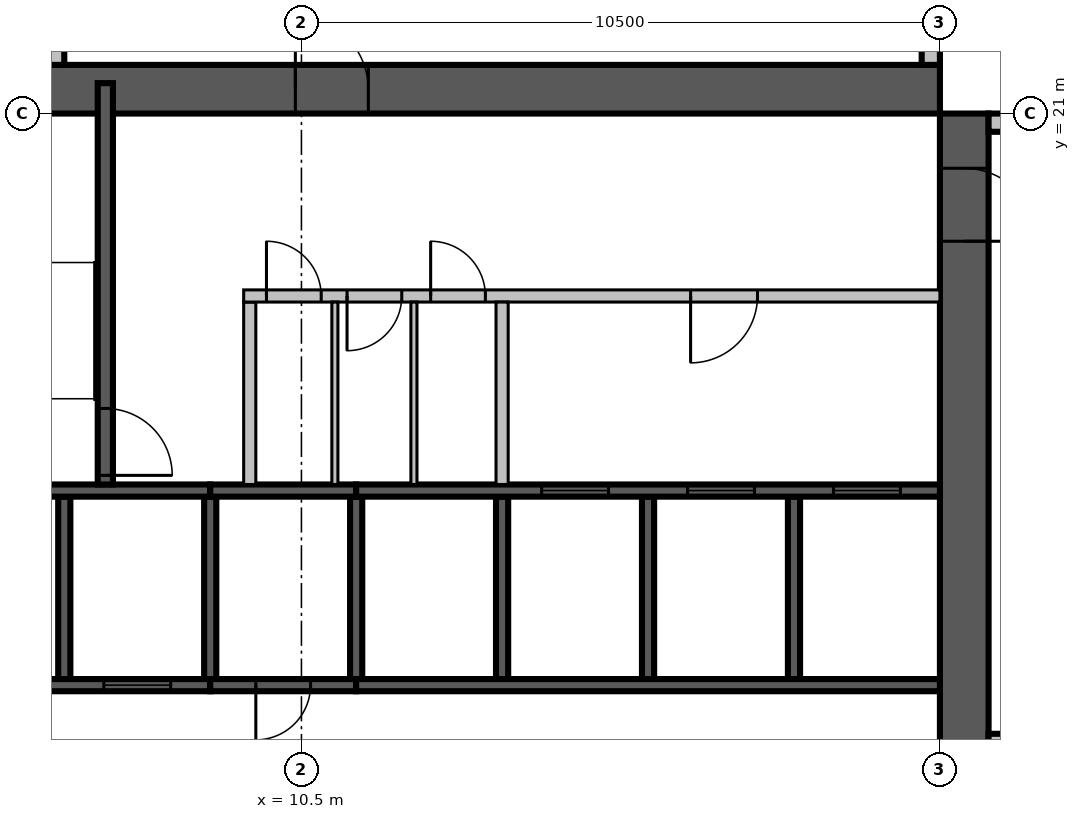
"""IFC4 building model, lengths in metres.
Left out: names, types, materials, properties, quantities, classifications, styles, units other than length and angle.
Written with IfcOpenShell. Run it as: python <this file> out.ifc"""

import sys

from ifc_helpers import new_model, si_unit, direction, frame, frame_2d, origin, place, context, subcontext, project, spatial, rectangle, extrude, source, transform, mapped, element, fill, save


model = new_model("IFC4")
c1 = context("Model", 3, precision=1e-05, world=origin(), true_north=direction((0.0, 1.0)))
c2 = subcontext(c1, "Body", "Model", "MODEL_VIEW")
j1 = project(units=[si_unit("LENGTHUNIT", "METRE"), si_unit("PLANEANGLEUNIT", "RADIAN")], contexts=[c1])
p1 = place(None, origin())
s1 = spatial("IfcSite", under=j1, at=p1, CompositionType="ELEMENT")
p2 = place(p1, origin())
s2 = spatial("IfcBuilding", under=s1, at=p2, CompositionType="ELEMENT")
p3 = place(p2, frame((0.0, 0.0, 261.4)))
s3 = spatial("IfcBuildingStorey", under=s2, at=p3, CompositionType="ELEMENT", Elevation=261.4)
m1 = source(origin(), c2, "Body", "SweptSolid", [
    extrude(rectangle(XDim=16.8, YDim=0.8, at=frame_2d((8.4, 0.0))), origin(), (0.0, 0.0, 1.0), 3.8),
])
p4 = place(p3, frame((21.4, 4.2, 0.0), z_axis=(0.0, 0.0, 1.0), x_axis=(0.0, 1.0, 0.0)))
e1 = element("IfcWall", 1, at=p4, inside=s3, PredefinedType="SHEAR", context=c2, shape_type="MappedRepresentation", body=[
    mapped(m1, transform((0.0, 0.0, 0.0), scale=1.0)),
])
m2 = source(origin(), c2, "Body", "SweptSolid", [
    extrude(rectangle(XDim=1.2, YDim=2.1, at=frame_2d((0.6, 1.05))), frame((0.0, 0.41, 0.0), z_axis=(0.0, -1.0, 0.0), x_axis=(1.0, 0.0, 0.0)), (0.0, 0.0, 1.0), 0.82),
])
p5 = place(p4, frame((14.7, 0.0, 0.0)))
e2 = element("IfcOpeningElement", 2, at=p5, cuts=e1, PredefinedType="OPENING", context=c2, shape_type="MappedRepresentation", body=[
    mapped(m2, transform((0.0, 0.0, 0.0), scale=1.0)),
])
p6 = place(p3, frame((4.2, 21.4, 0.0), z_axis=(0.0, 0.0, 1.0), x_axis=(1.0, 0.0, 0.0)))
e3 = element("IfcWall", 3, at=p6, inside=s3, PredefinedType="SHEAR", context=c2, shape_type="MappedRepresentation", body=[
    mapped(m1, transform((0.0, 0.0, 0.0), scale=1.0)),
])
p7 = place(p6, frame((6.2, 0.0, 0.0)))
e4 = element("IfcOpeningElement", 4, at=p7, cuts=e3, PredefinedType="OPENING", context=c2, shape_type="MappedRepresentation", body=[
    mapped(m2, transform((0.0, 0.0, 0.0), scale=1.0)),
])
m3 = source(origin(), c2, "Body", "SweptSolid", [
    extrude(rectangle(XDim=7.2, YDim=0.3, at=frame_2d((3.6, 0.0))), origin(), (0.0, 0.0, 1.0), 3.4),
])
p8 = place(p3, frame((21.8, 10.65, 0.0), z_axis=(0.0, 0.0, 1.0), x_axis=(1.0, 0.0, 0.0)))
e5 = element("IfcWall", 5, at=p8, inside=s3, PredefinedType="STANDARD", context=c2, shape_type="MappedRepresentation", body=[
    mapped(m3, transform((0.0, 0.0, 0.0), scale=1.0)),
])
m4 = source(origin(), c2, "Body", "SweptSolid", [
    extrude(rectangle(XDim=1.8, YDim=2.3, at=frame_2d((0.9, 1.15))), frame((0.0, 0.16, 0.0), z_axis=(0.0, -1.0, 0.0), x_axis=(1.0, 0.0, 0.0)), (0.0, 0.0, 1.0), 0.32),
])
p9 = place(p8, frame((0.4, 0.0, 0.6)))
e6 = element("IfcOpeningElement", 6, at=p9, cuts=e5, PredefinedType="OPENING", context=c2, shape_type="MappedRepresentation", body=[
    mapped(m4, transform((0.0, 0.0, 0.0), scale=1.0)),
])
p10 = place(p8, frame((4.787, 0.0, 0.6)))
e7 = element("IfcOpeningElement", 7, at=p10, cuts=e5, PredefinedType="OPENING", context=c2, shape_type="MappedRepresentation", body=[
    mapped(m4, transform((0.0, 0.0, 0.0), scale=1.0)),
])
p11 = place(p3, frame((29.0, 20.85, 0.0), z_axis=(0.0, 0.0, 1.0), x_axis=(-1.0, 0.0, 0.0)))
e8 = element("IfcWall", 8, at=p11, inside=s3, PredefinedType="STANDARD", context=c2, shape_type="MappedRepresentation", body=[
    mapped(m3, transform((0.0, 0.0, 0.0), scale=1.0)),
])
p12 = place(p11, frame((0.613, 0.0, 0.6)))
e9 = element("IfcOpeningElement", 9, at=p12, cuts=e8, PredefinedType="OPENING", context=c2, shape_type="MappedRepresentation", body=[
    mapped(m4, transform((0.0, 0.0, 0.0), scale=1.0)),
])
p13 = place(p11, frame((5.0, 0.0, 0.6)))
e10 = element("IfcOpeningElement", 10, at=p13, cuts=e8, PredefinedType="OPENING", context=c2, shape_type="MappedRepresentation", body=[
    mapped(m4, transform((0.0, 0.0, 0.0), scale=1.0)),
])
p14 = place(p3, frame((20.85, 21.8, 0.0), z_axis=(0.0, 0.0, 1.0), x_axis=(0.0, 1.0, 0.0)))
e11 = element("IfcWall", 11, at=p14, inside=s3, PredefinedType="STANDARD", context=c2, shape_type="MappedRepresentation", body=[
    mapped(m3, transform((0.0, 0.0, 0.0), scale=1.0)),
])
p15 = place(p14, frame((0.4, 0.0, 0.6)))
e12 = element("IfcOpeningElement", 12, at=p15, cuts=e11, PredefinedType="OPENING", context=c2, shape_type="MappedRepresentation", body=[
    mapped(m4, transform((0.0, 0.0, 0.0), scale=1.0)),
])
m5 = source(origin(), c2, "Body", "SweptSolid", [
    extrude(rectangle(XDim=1.0, YDim=2.1, at=frame_2d((0.5, 1.05))), frame((0.0, 0.16, 0.0), z_axis=(0.0, -1.0, 0.0), x_axis=(1.0, 0.0, 0.0)), (0.0, 0.0, 1.0), 0.32),
])
p16 = place(p14, frame((5.292, 0.0, 0.0)))
e13 = element("IfcOpeningElement", 13, at=p16, cuts=e11, PredefinedType="OPENING", context=c2, shape_type="MappedRepresentation", body=[
    mapped(m5, transform((0.0, 0.0, 0.0), scale=1.0)),
])
m6 = source(origin(), c2, "Body", "SweptSolid", [
    extrude(rectangle(XDim=16.6, YDim=0.3, at=frame_2d((8.3, 0.0))), origin(), (0.0, 0.0, 1.0), 3.4),
])
p17 = place(p3, frame((6.45, 38.4, 0.0), z_axis=(0.0, 0.0, 1.0), x_axis=(0.0, -1.0, 0.0)))
e14 = element("IfcWall", 14, at=p17, inside=s3, PredefinedType="STANDARD", context=c2, shape_type="MappedRepresentation", body=[
    mapped(m6, transform((0.0, 0.0, 0.0), scale=1.0)),
])
p18 = place(p17, frame((1.15, 0.0, 0.6)))
e15 = element("IfcOpeningElement", 15, at=p18, cuts=e14, PredefinedType="OPENING", context=c2, shape_type="MappedRepresentation", body=[
    mapped(m4, transform((0.0, 0.0, 0.0), scale=1.0)),
])
m7 = source(origin(), c2, "Body", "SweptSolid", [
    extrude(rectangle(XDim=2.4, YDim=2.3, at=frame_2d((1.2, 1.15))), frame((0.0, 0.16, 0.0), z_axis=(0.0, -1.0, 0.0), x_axis=(1.0, 0.0, 0.0)), (0.0, 0.0, 1.0), 0.32),
])
p19 = place(p17, frame((4.75, 0.0, 0.6)))
e16 = element("IfcOpeningElement", 16, at=p19, cuts=e14, PredefinedType="OPENING", context=c2, shape_type="MappedRepresentation", body=[
    mapped(m7, transform((0.0, 0.0, 0.0), scale=1.0)),
])
p20 = place(p17, frame((9.438, 0.0, 0.6)))
e17 = element("IfcOpeningElement", 17, at=p20, cuts=e14, PredefinedType="OPENING", context=c2, shape_type="MappedRepresentation", body=[
    mapped(m4, transform((0.0, 0.0, 0.0), scale=1.0)),
])
m8 = source(origin(), c2, "Body", "SweptSolid", [
    extrude(rectangle(XDim=3.0, YDim=2.3, at=frame_2d((1.5, 1.15))), frame((0.0, 0.16, 0.0), z_axis=(0.0, -1.0, 0.0), x_axis=(1.0, 0.0, 0.0)), (0.0, 0.0, 1.0), 0.32),
])
p21 = place(p17, frame((12.7, 0.0, 0.6)))
e18 = element("IfcOpeningElement", 18, at=p21, cuts=e14, PredefinedType="OPENING", context=c2, shape_type="MappedRepresentation", body=[
    mapped(m8, transform((0.0, 0.0, 0.0), scale=1.0)),
])
m9 = source(origin(), c2, "Body", "SweptSolid", [
    extrude(rectangle(XDim=3.0, YDim=0.2, at=frame_2d((1.5, 0.0))), origin(), (0.0, 0.0, 1.0), 3.8),
])
p22 = place(p3, frame((6.6, 11.7, 0.0), z_axis=(0.0, 0.0, 1.0), x_axis=(0.0, 1.0, 0.0)))
e19 = element("IfcWall", 19, at=p22, inside=s3, PredefinedType="SOLIDWALL", context=c2, shape_type="MappedRepresentation", body=[
    mapped(m9, transform((0.0, 0.0, 0.0), scale=1.0)),
])
m10 = source(origin(), c2, "Body", "SweptSolid", [
    extrude(rectangle(XDim=3.0, YDim=0.2, at=frame_2d((1.5, 0.0))), origin(), (0.0, 0.0, 1.0), 3.4),
])
for number, where, z_axis, x_axis in (
    (20, (9.0, 11.7, 0.0), (0.0, 0.0, 1.0), (0.0, 1.0, 0.0)),
    (21, (11.4, 11.7, 0.0), (0.0, 0.0, 1.0), (0.0, 1.0, 0.0)),
):
    element("IfcWall", number, at=place(p3, frame(where, z_axis=z_axis, x_axis=x_axis)), inside=s3, PredefinedType="SOLIDWALL", context=c2, shape_type="MappedRepresentation", body=[
        mapped(m10, transform((0.0, 0.0, 0.0), scale=1.0)),
    ])
for number, where, z_axis, x_axis in (
    (22, (13.8, 11.7, 0.0), (0.0, 0.0, 1.0), (0.0, 1.0, 0.0)),
    (23, (16.2, 11.7, 0.0), (0.0, 0.0, 1.0), (0.0, 1.0, 0.0)),
    (24, (18.6, 11.7, 0.0), (0.0, 0.0, 1.0), (0.0, 1.0, 0.0)),
):
    element("IfcWall", number, at=place(p3, frame(where, z_axis=z_axis, x_axis=x_axis)), inside=s3, PredefinedType="SOLIDWALL", context=c2, shape_type="MappedRepresentation", body=[
        mapped(m9, transform((0.0, 0.0, 0.0), scale=1.0)),
    ])
m11 = source(origin(), c2, "Body", "SweptSolid", [
    extrude(rectangle(XDim=4.8, YDim=0.2, at=frame_2d((2.4, 0.0))), origin(), (0.0, 0.0, 1.0), 3.8),
])
p23 = place(p3, frame((4.2, 11.6, 0.0), z_axis=(0.0, 0.0, 1.0), x_axis=(1.0, 0.0, 0.0)))
e25 = element("IfcWall", 25, at=p23, inside=s3, PredefinedType="SOLIDWALL", context=c2, shape_type="MappedRepresentation", body=[
    mapped(m11, transform((0.0, 0.0, 0.0), scale=1.0)),
])
m12 = source(origin(), c2, "Body", "SweptSolid", [
    extrude(rectangle(XDim=1.1, YDim=2.1, at=frame_2d((0.55, 1.05))), frame((0.0, 0.11, 0.0), z_axis=(0.0, -1.0, 0.0), x_axis=(1.0, 0.0, 0.0)), (0.0, 0.0, 1.0), 0.22),
])
p24 = place(p23, frame((0.65, 0.0, 0.0)))
e26 = element("IfcOpeningElement", 26, at=p24, cuts=e25, PredefinedType="OPENING", context=c2, shape_type="MappedRepresentation", body=[
    mapped(m12, transform((0.0, 0.0, 0.0), scale=1.0)),
])
p25 = place(p23, frame((3.05, 0.0, 0.0)))
e27 = element("IfcOpeningElement", 27, at=p25, cuts=e25, PredefinedType="OPENING", context=c2, shape_type="MappedRepresentation", body=[
    mapped(m12, transform((0.0, 0.0, 0.0), scale=1.0)),
])
m13 = source(origin(), c2, "Body", "SweptSolid", [
    extrude(rectangle(XDim=2.4, YDim=0.2, at=frame_2d((1.2, 0.0))), origin(), (0.0, 0.0, 1.0), 3.4),
])
p26 = place(p3, frame((9.0, 11.6, 0.0), z_axis=(0.0, 0.0, 1.0), x_axis=(1.0, 0.0, 0.0)))
e28 = element("IfcWall", 28, at=p26, inside=s3, PredefinedType="SOLIDWALL", context=c2, shape_type="MappedRepresentation", body=[
    mapped(m13, transform((0.0, 0.0, 0.0), scale=1.0)),
])
m14 = source(origin(), c2, "Body", "SweptSolid", [
    extrude(rectangle(XDim=0.9, YDim=2.1, at=frame_2d((0.45, 1.05))), frame((0.0, 0.11, 0.0), z_axis=(0.0, -1.0, 0.0), x_axis=(1.0, 0.0, 0.0)), (0.0, 0.0, 1.0), 0.22),
])
p27 = place(p26, frame((0.75, 0.0, 0.0)))
e29 = element("IfcOpeningElement", 29, at=p27, cuts=e28, PredefinedType="OPENING", context=c2, shape_type="MappedRepresentation", body=[
    mapped(m14, transform((0.0, 0.0, 0.0), scale=1.0)),
])
m15 = source(origin(), c2, "Body", "SweptSolid", [
    extrude(rectangle(XDim=9.6, YDim=0.2, at=frame_2d((4.8, 0.0))), origin(), (0.0, 0.0, 1.0), 3.8),
])
p28 = place(p3, frame((11.4, 11.6, 0.0), z_axis=(0.0, 0.0, 1.0), x_axis=(1.0, 0.0, 0.0)))
e30 = element("IfcWall", 30, at=p28, inside=s3, PredefinedType="SOLIDWALL", context=c2, shape_type="MappedRepresentation", body=[
    mapped(m15, transform((0.0, 0.0, 0.0), scale=1.0)),
])
p29 = place(p3, frame((4.2, 14.8, 0.0), z_axis=(0.0, 0.0, 1.0), x_axis=(1.0, 0.0, 0.0)))
e31 = element("IfcWall", 31, at=p29, inside=s3, PredefinedType="SOLIDWALL", context=c2, shape_type="MappedRepresentation", body=[
    mapped(m11, transform((0.0, 0.0, 0.0), scale=1.0)),
])
p30 = place(p3, frame((9.0, 14.8, 0.0), z_axis=(0.0, 0.0, 1.0), x_axis=(1.0, 0.0, 0.0)))
e32 = element("IfcWall", 32, at=p30, inside=s3, PredefinedType="SOLIDWALL", context=c2, shape_type="MappedRepresentation", body=[
    mapped(m13, transform((0.0, 0.0, 0.0), scale=1.0)),
])
p31 = place(p3, frame((11.4, 14.8, 0.0), z_axis=(0.0, 0.0, 1.0), x_axis=(1.0, 0.0, 0.0)))
e33 = element("IfcWall", 33, at=p31, inside=s3, PredefinedType="SOLIDWALL", context=c2, shape_type="MappedRepresentation", body=[
    mapped(m15, transform((0.0, 0.0, 0.0), scale=1.0)),
])
p32 = place(p31, frame((3.05, 0.0, 0.0)))
e34 = element("IfcOpeningElement", 34, at=p32, cuts=e33, PredefinedType="OPENING", context=c2, shape_type="MappedRepresentation", body=[
    mapped(m12, transform((0.0, 0.0, 0.0), scale=1.0)),
])
p33 = place(p31, frame((5.45, 0.0, 0.0)))
e35 = element("IfcOpeningElement", 35, at=p33, cuts=e33, PredefinedType="OPENING", context=c2, shape_type="MappedRepresentation", body=[
    mapped(m12, transform((0.0, 0.0, 0.0), scale=1.0)),
])
p34 = place(p31, frame((7.85, 0.0, 0.0)))
e36 = element("IfcOpeningElement", 36, at=p34, cuts=e33, PredefinedType="OPENING", context=c2, shape_type="MappedRepresentation", body=[
    mapped(m12, transform((0.0, 0.0, 0.0), scale=1.0)),
])
m16 = source(origin(), c2, "Body", "SweptSolid", [
    extrude(rectangle(XDim=6.6, YDim=0.25, at=frame_2d((3.3, 0.0))), origin(), (0.0, 0.0, 1.0), 3.4),
])
p35 = place(p3, frame((7.275, 14.9, 0.0), z_axis=(0.0, 0.0, 1.0), x_axis=(0.0, 1.0, 0.0)))
e37 = element("IfcWall", 37, at=p35, inside=s3, PredefinedType="SOLIDWALL", context=c2, shape_type="MappedRepresentation", body=[
    mapped(m16, transform((0.0, 0.0, 0.0), scale=1.0)),
])
m17 = source(origin(), c2, "Body", "SweptSolid", [
    extrude(rectangle(XDim=1.1, YDim=2.1, at=frame_2d((0.55, 1.05))), frame((0.0, 0.135, 0.0), z_axis=(0.0, -1.0, 0.0), x_axis=(1.0, 0.0, 0.0)), (0.0, 0.0, 1.0), 0.27),
])
p36 = place(p35, frame((0.15, 0.0, 0.0)))
e38 = element("IfcOpeningElement", 38, at=p36, cuts=e37, PredefinedType="OPENING", context=c2, shape_type="MappedRepresentation", body=[
    mapped(m17, transform((0.0, 0.0, 0.0), scale=1.0)),
])
m18 = source(origin(), c2, "Body", "SweptSolid", [
    extrude(rectangle(XDim=3.0, YDim=0.2, at=frame_2d((1.5, 0.0))), origin(), (0.0, 0.0, 1.0), 3.4),
])
p37 = place(p3, frame((9.65, 14.9, 0.0), z_axis=(0.0, 0.0, 1.0), x_axis=(0.0, 1.0, 0.0)))
e39 = element("IfcWall", 39, at=p37, inside=s3, PredefinedType="PARTITIONING", context=c2, shape_type="MappedRepresentation", body=[
    mapped(m18, transform((0.0, 0.0, 0.0), scale=1.0)),
])
m19 = source(origin(), c2, "Body", "SweptSolid", [
    extrude(rectangle(XDim=11.45, YDim=0.2, at=frame_2d((5.725, 0.0))), origin(), (0.0, 0.0, 1.0), 3.4),
])
p38 = place(p3, frame((9.55, 18.0, 0.0), z_axis=(0.0, 0.0, 1.0), x_axis=(1.0, 0.0, 0.0)))
e40 = element("IfcWall", 40, at=p38, inside=s3, PredefinedType="PARTITIONING", context=c2, shape_type="MappedRepresentation", body=[
    mapped(m19, transform((0.0, 0.0, 0.0), scale=1.0)),
])
p39 = place(p38, frame((0.375, 0.0, 0.0)))
e41 = element("IfcOpeningElement", 41, at=p39, cuts=e40, PredefinedType="OPENING", context=c2, shape_type="MappedRepresentation", body=[
    mapped(m14, transform((0.0, 0.0, 0.0), scale=1.0)),
])
p40 = place(p38, frame((1.7, 0.0, 0.0)))
e42 = element("IfcOpeningElement", 42, at=p40, cuts=e40, PredefinedType="OPENING", context=c2, shape_type="MappedRepresentation", body=[
    mapped(m14, transform((0.0, 0.0, 0.0), scale=1.0)),
])
p41 = place(p38, frame((3.075, 0.0, 0.0)))
e43 = element("IfcOpeningElement", 43, at=p41, cuts=e40, PredefinedType="OPENING", context=c2, shape_type="MappedRepresentation", body=[
    mapped(m14, transform((0.0, 0.0, 0.0), scale=1.0)),
])
p42 = place(p38, frame((7.35, 0.0, 0.0)))
e44 = element("IfcOpeningElement", 44, at=p42, cuts=e40, PredefinedType="OPENING", context=c2, shape_type="MappedRepresentation", body=[
    mapped(m12, transform((0.0, 0.0, 0.0), scale=1.0)),
])
p43 = place(p3, frame((13.8, 14.9, 0.0), z_axis=(0.0, 0.0, 1.0), x_axis=(0.0, 1.0, 0.0)))
e45 = element("IfcWall", 45, at=p43, inside=s3, PredefinedType="PARTITIONING", context=c2, shape_type="MappedRepresentation", body=[
    mapped(m18, transform((0.0, 0.0, 0.0), scale=1.0)),
])
m20 = source(origin(), c2, "Body", "SweptSolid", [
    extrude(rectangle(XDim=3.0, YDim=0.1, at=frame_2d((1.5, 0.0))), origin(), (0.0, 0.0, 1.0), 3.4),
])
for number, where, z_axis, x_axis in (
    (46, (11.05, 14.9, 0.0), (0.0, 0.0, 1.0), (0.0, 1.0, 0.0)),
    (47, (12.35, 14.9, 0.0), (0.0, 0.0, 1.0), (0.0, 1.0, 0.0)),
):
    element("IfcWall", number, at=place(p3, frame(where, z_axis=z_axis, x_axis=x_axis)), inside=s3, PredefinedType="PARTITIONING", context=c2, shape_type="MappedRepresentation", body=[
        mapped(m20, transform((0.0, 0.0, 0.0), scale=1.0)),
    ])
m21 = source(origin(), c2, "Body", "SweptSolid", [
    extrude(rectangle(XDim=1.1, YDim=2.1, at=frame_2d((0.55, 1.05))), frame((0.0, 0.025, 0.0), z_axis=(0.0, -1.0, 0.0), x_axis=(1.0, 0.0, 0.0)), (0.0, 0.0, 1.0), 0.05),
])
p44 = place(p25, origin())
e48 = element("IfcDoor", 48, at=p44, inside=s3, OperationType="SLIDING_TO_LEFT", PredefinedType="DOOR", context=c2, shape_type="MappedRepresentation", body=[
    mapped(m21, transform((0.0, 0.0, 0.0), scale=1.0)),
])
fill(e27, e48)
m22 = source(origin(), c2, "Body", "SweptSolid", [
    extrude(rectangle(XDim=0.9, YDim=2.1, at=frame_2d((0.45, 1.05))), frame((0.0, 0.025, 0.0), z_axis=(0.0, -1.0, 0.0), x_axis=(1.0, 0.0, 0.0)), (0.0, 0.0, 1.0), 0.05),
])
p45 = place(p27, origin())
e49 = element("IfcDoor", 49, at=p45, inside=s3, OperationType="SINGLE_SWING_RIGHT", PredefinedType="DOOR", context=c2, shape_type="MappedRepresentation", body=[
    mapped(m22, transform((0.0, 0.0, 0.0), scale=1.0)),
])
fill(e29, e49)
p46 = place(p32, origin())
e50 = element("IfcDoor", 50, at=p46, inside=s3, OperationType="SLIDING_TO_LEFT", PredefinedType="DOOR", context=c2, shape_type="MappedRepresentation", body=[
    mapped(m21, transform((0.0, 0.0, 0.0), scale=1.0)),
])
fill(e34, e50)
p47 = place(p33, origin())
e51 = element("IfcDoor", 51, at=p47, inside=s3, OperationType="SLIDING_TO_LEFT", PredefinedType="DOOR", context=c2, shape_type="MappedRepresentation", body=[
    mapped(m21, transform((0.0, 0.0, 0.0), scale=1.0)),
])
fill(e35, e51)
p48 = place(p34, origin())
e52 = element("IfcDoor", 52, at=p48, inside=s3, OperationType="SLIDING_TO_LEFT", PredefinedType="DOOR", context=c2, shape_type="MappedRepresentation", body=[
    mapped(m21, transform((0.0, 0.0, 0.0), scale=1.0)),
])
fill(e36, e52)
p49 = place(p36, origin())
e53 = element("IfcDoor", 53, at=p49, inside=s3, OperationType="SINGLE_SWING_RIGHT", PredefinedType="DOOR", context=c2, shape_type="MappedRepresentation", body=[
    mapped(m21, transform((0.0, 0.0, 0.0), scale=1.0)),
])
fill(e38, e53)
p50 = place(p39, origin())
e54 = element("IfcDoor", 54, at=p50, inside=s3, OperationType="SINGLE_SWING_LEFT", PredefinedType="DOOR", context=c2, shape_type="MappedRepresentation", body=[
    mapped(m22, transform((0.0, 0.0, 0.0), scale=1.0)),
])
fill(e41, e54)
p51 = place(p40, origin())
e55 = element("IfcDoor", 55, at=p51, inside=s3, OperationType="SINGLE_SWING_RIGHT", PredefinedType="DOOR", context=c2, shape_type="MappedRepresentation", body=[
    mapped(m22, transform((0.0, 0.0, 0.0), scale=1.0)),
])
fill(e42, e55)
p52 = place(p41, origin())
e56 = element("IfcDoor", 56, at=p52, inside=s3, OperationType="SINGLE_SWING_LEFT", PredefinedType="DOOR", context=c2, shape_type="MappedRepresentation", body=[
    mapped(m22, transform((0.0, 0.0, 0.0), scale=1.0)),
])
fill(e43, e56)
p53 = place(p42, origin())
e57 = element("IfcDoor", 57, at=p53, inside=s3, OperationType="SINGLE_SWING_RIGHT", PredefinedType="DOOR", context=c2, shape_type="MappedRepresentation", body=[
    mapped(m21, transform((0.0, 0.0, 0.0), scale=1.0)),
])
fill(e44, e57)
m23 = source(origin(), c2, "Body", "SweptSolid", [
    extrude(rectangle(XDim=1.2, YDim=2.1, at=frame_2d((0.6, 1.05))), frame((0.0, 0.025, 0.0), z_axis=(0.0, -1.0, 0.0), x_axis=(1.0, 0.0, 0.0)), (0.0, 0.0, 1.0), 0.05),
])
p54 = place(p7, origin())
e58 = element("IfcDoor", 58, at=p54, inside=s3, OperationType="SINGLE_SWING_LEFT", PredefinedType="DOOR", context=c2, shape_type="MappedRepresentation", body=[
    mapped(m23, transform((0.0, 0.0, 0.0), scale=1.0)),
])
fill(e4, e58)
p55 = place(p5, origin())
e59 = element("IfcDoor", 59, at=p55, inside=s3, OperationType="SINGLE_SWING_RIGHT", PredefinedType="DOOR", context=c2, shape_type="MappedRepresentation", body=[
    mapped(m23, transform((0.0, 0.0, 0.0), scale=1.0)),
])
fill(e2, e59)
save(model, sys.argv[1])
